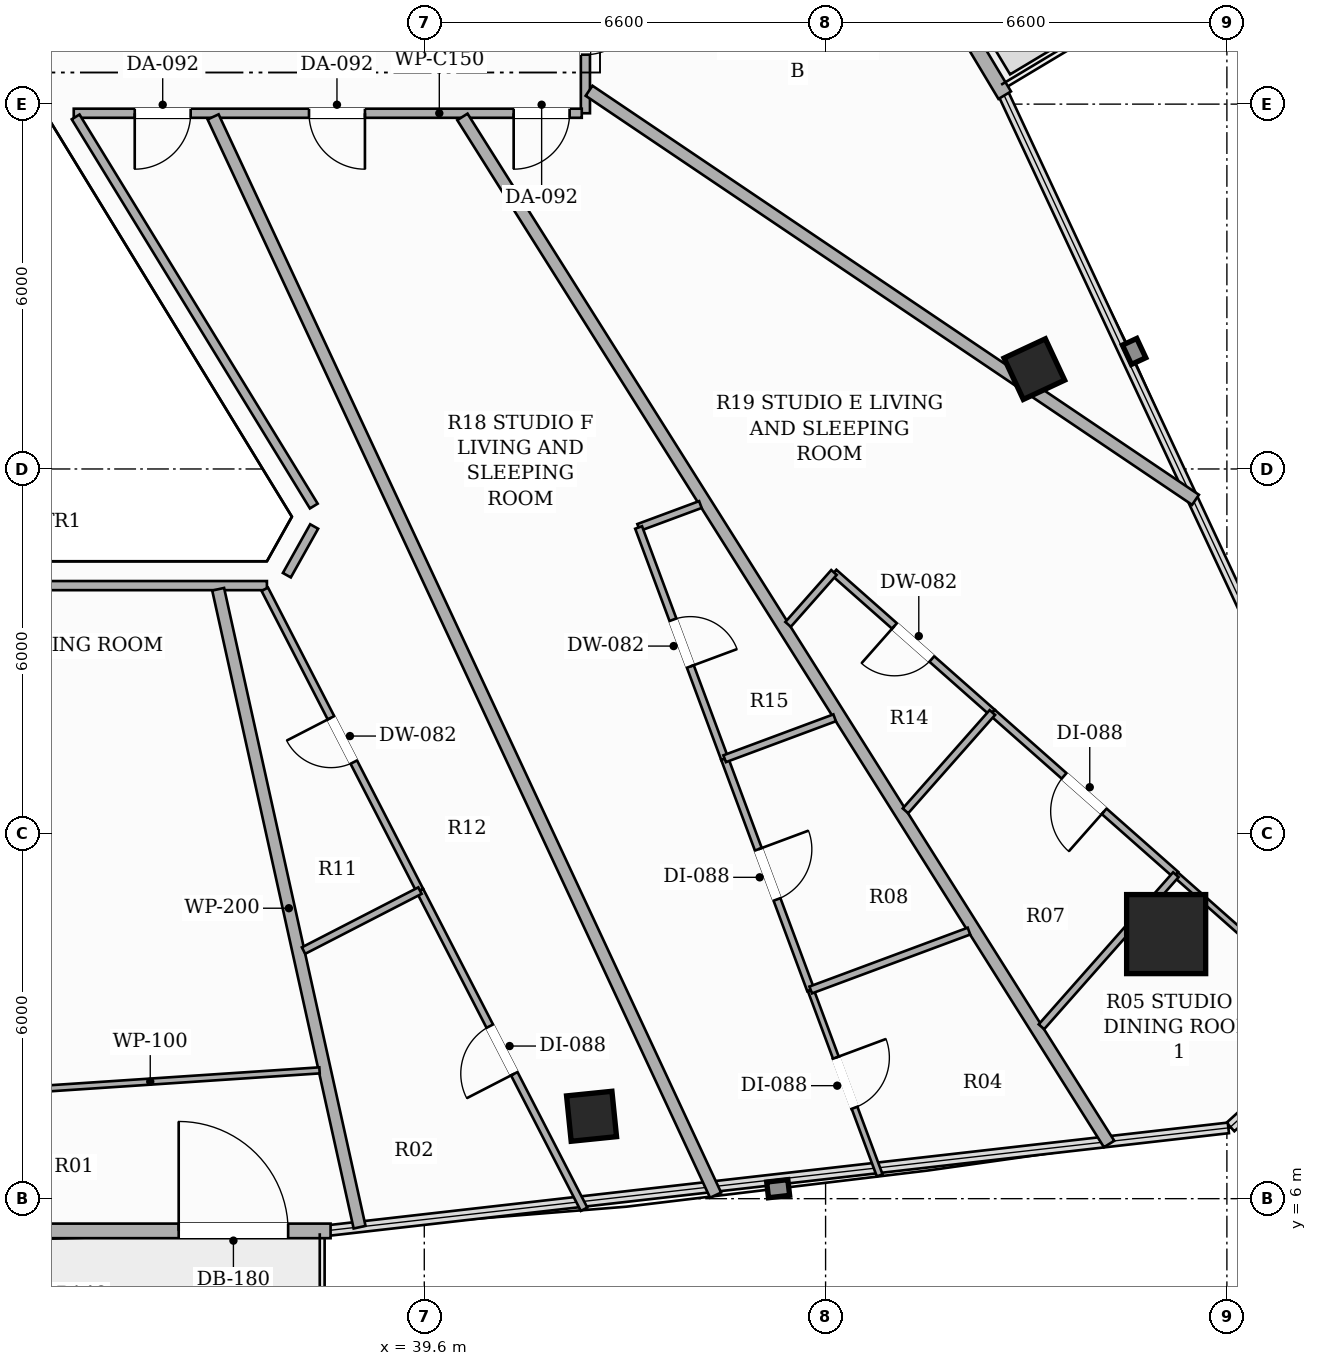
"""IFC4 building model, lengths in metres.
Left out: names, types, materials, properties, quantities, classifications, styles, units other than length and angle.
Written with IfcOpenShell. Run it as: python <this file> out.ifc"""

import sys

from ifc_helpers import new_model, si_unit, direction, frame, frame_2d, origin, origin_2d, place, context, subcontext, project, spatial, rectangle, hollow_rectangle, extrude, element, fill, save


model = new_model("IFC4")
c1 = context("Model", 3, precision=1e-05, world=origin(), true_north=direction((0.0, 1.0)))
c2 = subcontext(c1, "Body", "Model", "MODEL_VIEW")
j1 = project(units=[si_unit("LENGTHUNIT", "METRE"), si_unit("PLANEANGLEUNIT", "RADIAN")], contexts=[c1])
p1 = place(None, origin())
s1 = spatial("IfcSite", under=j1, at=p1, CompositionType="ELEMENT")
p2 = place(p1, origin())
s2 = spatial("IfcBuilding", under=s1, at=p2, CompositionType="ELEMENT")
p3 = place(p2, frame((0.0, 0.0, 250.25)))
s3 = spatial("IfcBuildingStorey", under=s2, at=p3, CompositionType="ELEMENT", Elevation=250.25)
p4 = place(p3, frame((51.801, 10.351, 0.0), z_axis=(0.0, 0.0, 1.0), x_axis=(1.0, 0.0, 0.0)))
e1 = element("IfcColumn", 1, at=p4, inside=s3, PredefinedType="COLUMN", context=c2, shape_type="SweptSolid", body=[
    extrude(hollow_rectangle(XDim=1.3, YDim=1.3, WallThickness=0.04, at=origin_2d()), origin(), (0.0, 0.0, 1.0), 3.3),
])
for number, where, z_axis, x_axis in (
    (2, (42.351, 7.355, 0.0), (0.0, 0.0, 1.0), (0.995, 0.101, 0.0)),
    (3, (49.633, 19.642, 0.0), (0.0, 0.0, 1.0), (-0.423, 0.906, 0.0)),
):
    element("IfcColumn", number, at=place(p3, frame(where, z_axis=z_axis, x_axis=x_axis)), inside=s3, PredefinedType="COLUMN", context=c2, shape_type="SweptSolid", body=[
        extrude(hollow_rectangle(XDim=0.75, YDim=0.75, WallThickness=0.025, at=origin_2d()), origin(), (0.0, 0.0, 1.0), 3.3),
    ])
p5 = place(p3, frame((27.941, 5.47, 0.0), z_axis=(0.0, 0.0, 1.0), x_axis=(1.0, 0.0, 0.0)))
e4 = element("IfcWall", 4, at=p5, inside=s3, PredefinedType="SOLIDWALL", context=c2, shape_type="SweptSolid", body=[
    extrude(rectangle(XDim=10.118, YDim=0.24, at=frame_2d((5.059, 0.0))), origin(), (0.0, 0.0, 1.0), 2.624),
])
p6 = place(p5, frame((7.62, 0.0, 0.0)))
e5 = element("IfcOpeningElement", 5, at=p6, cuts=e4, PredefinedType="OPENING", context=c2, shape_type="SweptSolid", body=[
    extrude(rectangle(XDim=1.8, YDim=2.2, at=frame_2d((0.9, 1.1))), frame((0.0, 0.13, 0.0), z_axis=(0.0, -1.0, 0.0), x_axis=(1.0, 0.0, 0.0)), (0.0, 0.0, 1.0), 0.26),
])
p7 = place(p3, frame((49.146, 24.147, 0.0), z_axis=(0.0, 0.0, 1.0), x_axis=(-0.514275407092, 0.857625096216, 0.0)))
e6 = element("IfcWall", 6, at=p7, inside=s3, PredefinedType="SOLIDWALL", context=c2, shape_type="SweptSolid", body=[
    extrude(rectangle(XDim=9.777, YDim=0.24, at=frame_2d((4.889, 0.0))), origin(), (0.0, 0.0, 1.0), 2.624),
])
p8 = place(p7, frame((7.279, 0.0, 0.0)))
e7 = element("IfcOpeningElement", 7, at=p8, cuts=e6, PredefinedType="OPENING", context=c2, shape_type="SweptSolid", body=[
    extrude(rectangle(XDim=1.8, YDim=2.2, at=frame_2d((0.9, 1.1))), frame((0.0, 0.13, 0.0), z_axis=(0.0, -1.0, 0.0), x_axis=(1.0, 0.0, 0.0)), (0.0, 0.0, 1.0), 0.26),
])
p9 = place(p3, frame((42.25, 26.59, 0.0), z_axis=(0.0, 0.0, 1.0), x_axis=(0.0, -1.0, 0.0)))
e8 = element("IfcWall", 8, at=p9, inside=s3, PredefinedType="PARTITIONING", context=c2, shape_type="SweptSolid", body=[
    extrude(rectangle(XDim=2.74, YDim=0.15, at=frame_2d((1.37, 0.0))), origin(), (0.0, 0.0, 1.0), 2.773),
])
p10 = place(p9, frame((0.897, 0.0, 0.0)))
e9 = element("IfcOpeningElement", 9, at=p10, cuts=e8, PredefinedType="OPENING", context=c2, shape_type="SweptSolid", body=[
    extrude(rectangle(XDim=0.88, YDim=2.1, at=frame_2d((0.44, 1.05))), frame((0.0, 0.085, 0.0), z_axis=(0.0, -1.0, 0.0), x_axis=(1.0, 0.0, 0.0)), (0.0, 0.0, 1.0), 0.17),
])
p11 = place(p3, frame((42.19, 23.85, 0.0), z_axis=(0.0, 0.0, 1.0), x_axis=(-1.0, 0.0, 0.0)))
e10 = element("IfcWall", 10, at=p11, inside=s3, PredefinedType="PARTITIONING", context=c2, shape_type="SweptSolid", body=[
    extrude(rectangle(XDim=8.355, YDim=0.15, at=frame_2d((4.177, 0.0))), origin(), (0.0, 0.0, 1.0), 2.565),
])
p12 = place(p11, frame((0.2, 0.0, 0.0)))
e11 = element("IfcOpeningElement", 11, at=p12, cuts=e10, PredefinedType="OPENING", context=c2, shape_type="SweptSolid", body=[
    extrude(rectangle(XDim=0.92, YDim=2.15, at=frame_2d((0.46, 1.075))), frame((0.0, 0.085, 0.0), z_axis=(0.0, -1.0, 0.0), x_axis=(1.0, 0.0, 0.0)), (0.0, 0.0, 1.0), 0.17),
])
p13 = place(p11, frame((3.566, 0.0, 0.0)))
e12 = element("IfcOpeningElement", 12, at=p13, cuts=e10, PredefinedType="OPENING", context=c2, shape_type="SweptSolid", body=[
    extrude(rectangle(XDim=0.92, YDim=2.15, at=frame_2d((0.46, 1.075))), frame((0.0, 0.085, 0.0), z_axis=(0.0, -1.0, 0.0), x_axis=(1.0, 0.0, 0.0)), (0.0, 0.0, 1.0), 0.17),
])
p14 = place(p11, frame((6.432, 0.0, 0.0)))
e13 = element("IfcOpeningElement", 13, at=p14, cuts=e10, PredefinedType="OPENING", context=c2, shape_type="SweptSolid", body=[
    extrude(rectangle(XDim=0.92, YDim=2.15, at=frame_2d((0.46, 1.075))), frame((0.0, 0.085, 0.0), z_axis=(0.0, -1.0, 0.0), x_axis=(1.0, 0.0, 0.0)), (0.0, 0.0, 1.0), 0.17),
])
p15 = place(p3, frame((33.866, 23.79, 0.0), z_axis=(0.0, 0.0, 1.0), x_axis=(0.522011859837, -0.852938226479, 0.0)))
e14 = element("IfcWall", 14, at=p15, inside=s3, PredefinedType="PARTITIONING", context=c2, shape_type="SweptSolid", body=[
    extrude(rectangle(XDim=7.504, YDim=0.15, at=frame_2d((3.752, 0.0))), origin(), (0.0, 0.0, 1.0), 2.773),
])
p16 = place(p3, frame((37.789, 17.054, 0.0), z_axis=(0.0, 0.0, 1.0), x_axis=(-0.488935266506, -0.872320070368, 0.0)))
e15 = element("IfcWall", 15, at=p16, inside=s3, PredefinedType="PARTITIONING", context=c2, shape_type="SweptSolid", body=[
    extrude(rectangle(XDim=0.918, YDim=0.15, at=frame_2d((0.459, 0.0))), origin(), (0.0, 0.0, 1.0), 3.06),
])
p17 = place(p3, frame((37.012, 16.082, 0.0), z_axis=(0.0, 0.0, 1.0), x_axis=(-1.0, 0.0, 0.0)))
e16 = element("IfcWall", 16, at=p17, inside=s3, PredefinedType="PARTITIONING", context=c2, shape_type="SweptSolid", body=[
    extrude(rectangle(XDim=8.024, YDim=0.15, at=frame_2d((4.012, 0.0))), origin(), (0.0, 0.0, 1.0), 2.773),
])
p18 = place(p3, frame((36.21, 16.022, 0.0), z_axis=(0.0, 0.0, 1.0), x_axis=(0.216451711791, -0.976293325012, 0.0)))
e17 = element("IfcWall", 17, at=p18, inside=s3, PredefinedType="PARTITIONING", context=c2, shape_type="SweptSolid", body=[
    extrude(rectangle(XDim=10.746, YDim=0.2, at=frame_2d((5.373, 0.0))), origin(), (0.0, 0.0, 1.0), 2.492),
])
p19 = place(p3, frame((52.284, 17.493, 0.0), z_axis=(0.0, 0.0, 1.0), x_axis=(-0.829053532208, 0.559169241584, 0.0)))
e18 = element("IfcWall", 18, at=p19, inside=s3, PredefinedType="PARTITIONING", context=c2, shape_type="SweptSolid", body=[
    extrude(rectangle(XDim=12.031, YDim=0.2, at=frame_2d((6.015, 0.0))), origin(), (0.0, 0.0, 1.0), 2.492),
])
p20 = place(p3, frame((50.863, 6.899, 0.0), z_axis=(0.0, 0.0, 1.0), x_axis=(-0.532843438342, 0.846213844259, 0.0)))
e19 = element("IfcWall", 19, at=p20, inside=s3, PredefinedType="PARTITIONING", context=c2, shape_type="SweptSolid", body=[
    extrude(rectangle(XDim=19.961, YDim=0.2, at=frame_2d((9.98, 0.0))), origin(), (0.0, 0.0, 1.0), 2.492),
])
p21 = place(p3, frame((44.391, 6.058, 0.0), z_axis=(0.0, 0.0, 1.0), x_axis=(-0.422434507673, 0.906393450289, 0.0)))
e20 = element("IfcWall", 20, at=p21, inside=s3, PredefinedType="PARTITIONING", context=c2, shape_type="SweptSolid", body=[
    extrude(rectangle(XDim=19.563, YDim=0.2, at=frame_2d((9.782, 0.0))), origin(), (0.0, 0.0, 1.0), 2.492),
])
p22 = place(p3, frame((37.877, 8.11, 0.0), z_axis=(0.0, 0.0, 1.0), x_axis=(-0.997794804299, -0.066374155471, 0.0)))
e21 = element("IfcWall", 21, at=p22, inside=s3, PredefinedType="PARTITIONING", context=c2, shape_type="SweptSolid", body=[
    extrude(rectangle(XDim=10.851, YDim=0.1, at=frame_2d((5.425, 0.0))), origin(), (0.0, 0.0, 1.0), 2.492),
])
p23 = place(p22, frame((5.68, 0.0, 0.0)))
e22 = element("IfcOpeningElement", 22, at=p23, cuts=e21, PredefinedType="OPENING", context=c2, shape_type="SweptSolid", body=[
    extrude(rectangle(XDim=0.88, YDim=2.1, at=frame_2d((0.44, 1.05))), frame((0.0, 0.06, 0.0), z_axis=(0.0, -1.0, 0.0), x_axis=(1.0, 0.0, 0.0)), (0.0, 0.0, 1.0), 0.12),
])
p24 = place(p3, frame((48.943, 13.995, 0.0), z_axis=(0.0, 0.0, 1.0), x_axis=(-0.749231040751, 0.662308725275, 0.0)))
e23 = element("IfcWall", 23, at=p24, inside=s3, PredefinedType="PARTITIONING", context=c2, shape_type="SweptSolid", body=[
    extrude(rectangle(XDim=3.477, YDim=0.12, at=frame_2d((1.739, 0.0))), origin(), (0.0, 0.0, 1.0), 2.565),
])
p25 = place(p24, frame((1.329, 0.0, 0.0)))
e24 = element("IfcOpeningElement", 24, at=p25, cuts=e23, PredefinedType="OPENING", context=c2, shape_type="SweptSolid", body=[
    extrude(rectangle(XDim=0.82, YDim=2.1, at=frame_2d((0.41, 1.05))), frame((0.0, 0.07, 0.0), z_axis=(0.0, -1.0, 0.0), x_axis=(1.0, 0.0, 0.0)), (0.0, 0.0, 1.0), 0.14),
])
p26 = place(p3, frame((46.338, 16.298, 0.0), z_axis=(0.0, 0.0, 1.0), x_axis=(-0.662287293934, -0.749249985181, 0.0)))
e25 = element("IfcWall", 25, at=p26, inside=s3, PredefinedType="PARTITIONING", context=c2, shape_type="SweptSolid", body=[
    extrude(rectangle(XDim=1.14, YDim=0.12, at=frame_2d((0.57, 0.0))), origin(), (0.0, 0.0, 1.0), 3.06),
])
p27 = place(p3, frame((51.961, 11.328, 0.0), z_axis=(0.0, 0.0, 1.0), x_axis=(-0.749289212621, 0.662242913024, 0.0)))
e26 = element("IfcWall", 26, at=p27, inside=s3, PredefinedType="PARTITIONING", context=c2, shape_type="SweptSolid", body=[
    extrude(rectangle(XDim=4.028, YDim=0.12, at=frame_2d((2.014, 0.0))), origin(), (0.0, 0.0, 1.0), 2.492),
])
p28 = place(p27, frame((1.574, 0.0, 0.0)))
e27 = element("IfcOpeningElement", 27, at=p28, cuts=e26, PredefinedType="OPENING", context=c2, shape_type="SweptSolid", body=[
    extrude(rectangle(XDim=0.88, YDim=2.1, at=frame_2d((0.44, 1.05))), frame((0.0, 0.07, 0.0), z_axis=(0.0, -1.0, 0.0), x_axis=(1.0, 0.0, 0.0)), (0.0, 0.0, 1.0), 0.14),
])
p29 = place(p3, frame((53.03, 10.383, 0.0), z_axis=(0.0, 0.0, 1.0), x_axis=(-0.749313288423, 0.66221567166, 0.0)))
e28 = element("IfcWall", 28, at=p29, inside=s3, PredefinedType="PARTITIONING", context=c2, shape_type="SweptSolid", body=[
    extrude(rectangle(XDim=1.427, YDim=0.1, at=frame_2d((0.713, 0.0))), origin(), (0.0, 0.0, 1.0), 2.492),
])
p30 = place(p3, frame((48.943, 13.995, 0.0), z_axis=(0.0, 0.0, 1.0), x_axis=(-0.662212567735, -0.749316031547, 0.0)))
e29 = element("IfcWall", 29, at=p30, inside=s3, PredefinedType="PARTITIONING", context=c2, shape_type="SweptSolid", body=[
    extrude(rectangle(XDim=2.158, YDim=0.12, at=frame_2d((1.079, 0.0))), origin(), (0.0, 0.0, 1.0), 2.565),
])
p31 = place(p3, frame((51.961, 11.328, 0.0), z_axis=(0.0, 0.0, 1.0), x_axis=(-0.662327669466, -0.74921429395, 0.0)))
e30 = element("IfcWall", 30, at=p31, inside=s3, PredefinedType="PARTITIONING", context=c2, shape_type="SweptSolid", body=[
    extrude(rectangle(XDim=3.338, YDim=0.12, at=frame_2d((1.669, 0.0))), origin(), (0.0, 0.0, 1.0), 2.492),
])
p32 = place(p3, frame((44.141, 17.415, 0.0), z_axis=(0.0, 0.0, 1.0), x_axis=(-0.937563848777, -0.347813210599, 0.0)))
e31 = element("IfcWall", 31, at=p32, inside=s3, PredefinedType="PARTITIONING", context=c2, shape_type="SweptSolid", body=[
    extrude(rectangle(XDim=1.084, YDim=0.12, at=frame_2d((0.542, 0.0))), origin(), (0.0, 0.0, 1.0), 2.773),
])
p33 = place(p3, frame((43.125, 17.038, 0.0), z_axis=(0.0, 0.0, 1.0), x_axis=(0.348728795746, -0.937223680355, 0.0)))
e32 = element("IfcWall", 32, at=p33, inside=s3, PredefinedType="PARTITIONING", context=c2, shape_type="SweptSolid", body=[
    extrude(rectangle(XDim=4.058, YDim=0.12, at=frame_2d((2.029, 0.0))), origin(), (0.0, 0.0, 1.0), 2.773),
])
p34 = place(p33, frame((1.619, 0.0, 0.0)))
e33 = element("IfcOpeningElement", 33, at=p34, cuts=e32, PredefinedType="OPENING", context=c2, shape_type="SweptSolid", body=[
    extrude(rectangle(XDim=0.82, YDim=2.1, at=frame_2d((0.41, 1.05))), frame((0.0, 0.07, 0.0), z_axis=(0.0, -1.0, 0.0), x_axis=(1.0, 0.0, 0.0)), (0.0, 0.0, 1.0), 0.14),
])
p35 = place(p3, frame((44.54, 13.235, 0.0), z_axis=(0.0, 0.0, 1.0), x_axis=(0.348709131935, -0.937230996769, 0.0)))
e34 = element("IfcWall", 34, at=p35, inside=s3, PredefinedType="PARTITIONING", context=c2, shape_type="SweptSolid", body=[
    extrude(rectangle(XDim=4.058, YDim=0.12, at=frame_2d((2.029, 0.0))), origin(), (0.0, 0.0, 1.0), 3.06),
])
p36 = place(p35, frame((1.589, 0.0, 0.0)))
e35 = element("IfcOpeningElement", 35, at=p36, cuts=e34, PredefinedType="OPENING", context=c2, shape_type="SweptSolid", body=[
    extrude(rectangle(XDim=0.88, YDim=2.1, at=frame_2d((0.44, 1.05))), frame((0.0, 0.07, 0.0), z_axis=(0.0, -1.0, 0.0), x_axis=(1.0, 0.0, 0.0)), (0.0, 0.0, 1.0), 0.14),
])
p37 = place(p3, frame((45.955, 9.432, 0.0), z_axis=(0.0, 0.0, 1.0), x_axis=(0.34888547359, -0.937165367647, 0.0)))
e36 = element("IfcWall", 36, at=p37, inside=s3, PredefinedType="PARTITIONING", context=c2, shape_type="SweptSolid", body=[
    extrude(rectangle(XDim=3.253, YDim=0.1, at=frame_2d((1.626, 0.0))), origin(), (0.0, 0.0, 1.0), 2.492),
])
p38 = place(p37, frame((1.187, 0.0, 0.0)))
e37 = element("IfcOpeningElement", 37, at=p38, cuts=e36, PredefinedType="OPENING", context=c2, shape_type="SweptSolid", body=[
    extrude(rectangle(XDim=0.88, YDim=2.1, at=frame_2d((0.44, 1.05))), frame((0.0, 0.06, 0.0), z_axis=(0.0, -1.0, 0.0), x_axis=(1.0, 0.0, 0.0)), (0.0, 0.0, 1.0), 0.12),
])
p39 = place(p3, frame((46.349, 13.908, 0.0), z_axis=(0.0, 0.0, 1.0), x_axis=(-0.937271835507, -0.348599349347, 0.0)))
e38 = element("IfcWall", 38, at=p39, inside=s3, PredefinedType="PARTITIONING", context=c2, shape_type="SweptSolid", body=[
    extrude(rectangle(XDim=1.93, YDim=0.12, at=frame_2d((0.965, 0.0))), origin(), (0.0, 0.0, 1.0), 2.773),
])
p40 = place(p3, frame((48.558, 10.4, 0.0), z_axis=(0.0, 0.0, 1.0), x_axis=(-0.937286649549, -0.34855951655, 0.0)))
e39 = element("IfcWall", 39, at=p40, inside=s3, PredefinedType="PARTITIONING", context=c2, shape_type="SweptSolid", body=[
    extrude(rectangle(XDim=2.777, YDim=0.12, at=frame_2d((1.389, 0.0))), origin(), (0.0, 0.0, 1.0), 2.773),
])
p41 = place(p3, frame((39.529, 11.066, 0.0), z_axis=(0.0, 0.0, 1.0), x_axis=(-0.457798211716, 0.889056127221, 0.0)))
e40 = element("IfcWall", 40, at=p41, inside=s3, PredefinedType="PARTITIONING", context=c2, shape_type="SweptSolid", body=[
    extrude(rectangle(XDim=5.574, YDim=0.12, at=frame_2d((2.787, 0.0))), origin(), (0.0, 0.0, 1.0), 2.773),
])
p42 = place(p41, frame((2.377, 0.0, 0.0)))
e41 = element("IfcOpeningElement", 41, at=p42, cuts=e40, PredefinedType="OPENING", context=c2, shape_type="SweptSolid", body=[
    extrude(rectangle(XDim=0.82, YDim=2.1, at=frame_2d((0.41, 1.05))), frame((0.0, 0.07, 0.0), z_axis=(0.0, -1.0, 0.0), x_axis=(1.0, 0.0, 0.0)), (0.0, 0.0, 1.0), 0.14),
])
p43 = place(p3, frame((42.228, 5.826, 0.0), z_axis=(0.0, 0.0, 1.0), x_axis=(-0.457901041138, 0.889003170143, 0.0)))
e42 = element("IfcWall", 42, at=p43, inside=s3, PredefinedType="PARTITIONING", context=c2, shape_type="SweptSolid", body=[
    extrude(rectangle(XDim=5.894, YDim=0.12, at=frame_2d((2.947, 0.0))), origin(), (0.0, 0.0, 1.0), 2.492),
])
p44 = place(p43, frame((2.507, 0.0, 0.0)))
e43 = element("IfcOpeningElement", 43, at=p44, cuts=e42, PredefinedType="OPENING", context=c2, shape_type="SweptSolid", body=[
    extrude(rectangle(XDim=0.88, YDim=2.1, at=frame_2d((0.44, 1.05))), frame((0.0, 0.07, 0.0), z_axis=(0.0, -1.0, 0.0), x_axis=(1.0, 0.0, 0.0)), (0.0, 0.0, 1.0), 0.14),
])
p45 = place(p3, frame((39.529, 11.066, 0.0), z_axis=(0.0, 0.0, 1.0), x_axis=(-0.889105964634, -0.457701413207, 0.0)))
e44 = element("IfcWall", 44, at=p45, inside=s3, PredefinedType="PARTITIONING", context=c2, shape_type="SweptSolid", body=[
    extrude(rectangle(XDim=2.154, YDim=0.12, at=frame_2d((1.077, 0.0))), origin(), (0.0, 0.0, 1.0), 2.773),
])
p46 = place(p6, origin())
e45 = element("IfcDoor", 45, at=p46, inside=s3, OperationType="SINGLE_SWING_LEFT", PredefinedType="DOOR", context=c2, shape_type="SweptSolid", body=[
    extrude(rectangle(XDim=1.8, YDim=2.2, at=frame_2d((0.9, 1.1))), frame((0.0, 0.025, 0.0), z_axis=(0.0, -1.0, 0.0), x_axis=(1.0, 0.0, 0.0)), (0.0, 0.0, 1.0), 0.05),
])
fill(e5, e45)
p47 = place(p10, origin())
e46 = element("IfcDoor", 46, at=p47, inside=s3, OperationType="SINGLE_SWING_LEFT", PredefinedType="DOOR", context=c2, shape_type="SweptSolid", body=[
    extrude(rectangle(XDim=0.88, YDim=2.1, at=frame_2d((0.44, 1.05))), frame((0.0, 0.025, 0.0), z_axis=(0.0, -1.0, 0.0), x_axis=(1.0, 0.0, 0.0)), (0.0, 0.0, 1.0), 0.05),
])
fill(e9, e46)
p48 = place(p12, origin())
e47 = element("IfcDoor", 47, at=p48, inside=s3, OperationType="SINGLE_SWING_RIGHT", PredefinedType="DOOR", context=c2, shape_type="SweptSolid", body=[
    extrude(rectangle(XDim=0.92, YDim=2.15, at=frame_2d((0.46, 1.075))), frame((0.0, 0.025, 0.0), z_axis=(0.0, -1.0, 0.0), x_axis=(1.0, 0.0, 0.0)), (0.0, 0.0, 1.0), 0.05),
])
fill(e11, e47)
p49 = place(p25, origin())
e48 = element("IfcDoor", 48, at=p49, inside=s3, OperationType="SINGLE_SWING_RIGHT", PredefinedType="DOOR", context=c2, shape_type="SweptSolid", body=[
    extrude(rectangle(XDim=0.82, YDim=2.1, at=frame_2d((0.41, 1.05))), frame((0.0, 0.025, 0.0), z_axis=(0.0, -1.0, 0.0), x_axis=(1.0, 0.0, 0.0)), (0.0, 0.0, 1.0), 0.05),
])
fill(e24, e48)
p50 = place(p28, origin())
e49 = element("IfcDoor", 49, at=p50, inside=s3, OperationType="SINGLE_SWING_LEFT", PredefinedType="DOOR", context=c2, shape_type="SweptSolid", body=[
    extrude(rectangle(XDim=0.88, YDim=2.1, at=frame_2d((0.44, 1.05))), frame((0.0, 0.025, 0.0), z_axis=(0.0, -1.0, 0.0), x_axis=(1.0, 0.0, 0.0)), (0.0, 0.0, 1.0), 0.05),
])
fill(e27, e49)
p51 = place(p13, origin())
e50 = element("IfcDoor", 50, at=p51, inside=s3, OperationType="SINGLE_SWING_LEFT", PredefinedType="DOOR", context=c2, shape_type="SweptSolid", body=[
    extrude(rectangle(XDim=0.92, YDim=2.15, at=frame_2d((0.46, 1.075))), frame((0.0, 0.025, 0.0), z_axis=(0.0, -1.0, 0.0), x_axis=(1.0, 0.0, 0.0)), (0.0, 0.0, 1.0), 0.05),
])
fill(e12, e50)
p52 = place(p34, origin())
e51 = element("IfcDoor", 51, at=p52, inside=s3, OperationType="SINGLE_SWING_RIGHT", PredefinedType="DOOR", context=c2, shape_type="SweptSolid", body=[
    extrude(rectangle(XDim=0.82, YDim=2.1, at=frame_2d((0.41, 1.05))), frame((0.0, 0.025, 0.0), z_axis=(0.0, -1.0, 0.0), x_axis=(1.0, 0.0, 0.0)), (0.0, 0.0, 1.0), 0.05),
])
fill(e33, e51)
p53 = place(p36, origin())
e52 = element("IfcDoor", 52, at=p53, inside=s3, OperationType="SINGLE_SWING_LEFT", PredefinedType="DOOR", context=c2, shape_type="SweptSolid", body=[
    extrude(rectangle(XDim=0.88, YDim=2.1, at=frame_2d((0.44, 1.05))), frame((0.0, 0.025, 0.0), z_axis=(0.0, -1.0, 0.0), x_axis=(1.0, 0.0, 0.0)), (0.0, 0.0, 1.0), 0.05),
])
fill(e35, e52)
p54 = place(p38, origin())
e53 = element("IfcDoor", 53, at=p54, inside=s3, OperationType="SINGLE_SWING_LEFT", PredefinedType="DOOR", context=c2, shape_type="SweptSolid", body=[
    extrude(rectangle(XDim=0.88, YDim=2.1, at=frame_2d((0.44, 1.05))), frame((0.0, 0.025, 0.0), z_axis=(0.0, -1.0, 0.0), x_axis=(1.0, 0.0, 0.0)), (0.0, 0.0, 1.0), 0.05),
])
fill(e37, e53)
p55 = place(p14, origin())
e54 = element("IfcDoor", 54, at=p55, inside=s3, OperationType="SINGLE_SWING_RIGHT", PredefinedType="DOOR", context=c2, shape_type="SweptSolid", body=[
    extrude(rectangle(XDim=0.92, YDim=2.15, at=frame_2d((0.46, 1.075))), frame((0.0, 0.025, 0.0), z_axis=(0.0, -1.0, 0.0), x_axis=(1.0, 0.0, 0.0)), (0.0, 0.0, 1.0), 0.05),
])
fill(e13, e54)
p56 = place(p42, origin())
e55 = element("IfcDoor", 55, at=p56, inside=s3, OperationType="SINGLE_SWING_RIGHT", PredefinedType="DOOR", context=c2, shape_type="SweptSolid", body=[
    extrude(rectangle(XDim=0.82, YDim=2.1, at=frame_2d((0.41, 1.05))), frame((0.0, 0.025, 0.0), z_axis=(0.0, -1.0, 0.0), x_axis=(1.0, 0.0, 0.0)), (0.0, 0.0, 1.0), 0.05),
])
fill(e41, e55)
p57 = place(p44, origin())
e56 = element("IfcDoor", 56, at=p57, inside=s3, OperationType="SINGLE_SWING_LEFT", PredefinedType="DOOR", context=c2, shape_type="SweptSolid", body=[
    extrude(rectangle(XDim=0.88, YDim=2.1, at=frame_2d((0.44, 1.05))), frame((0.0, 0.025, 0.0), z_axis=(0.0, -1.0, 0.0), x_axis=(1.0, 0.0, 0.0)), (0.0, 0.0, 1.0), 0.05),
])
fill(e43, e56)
save(model, sys.argv[1])
